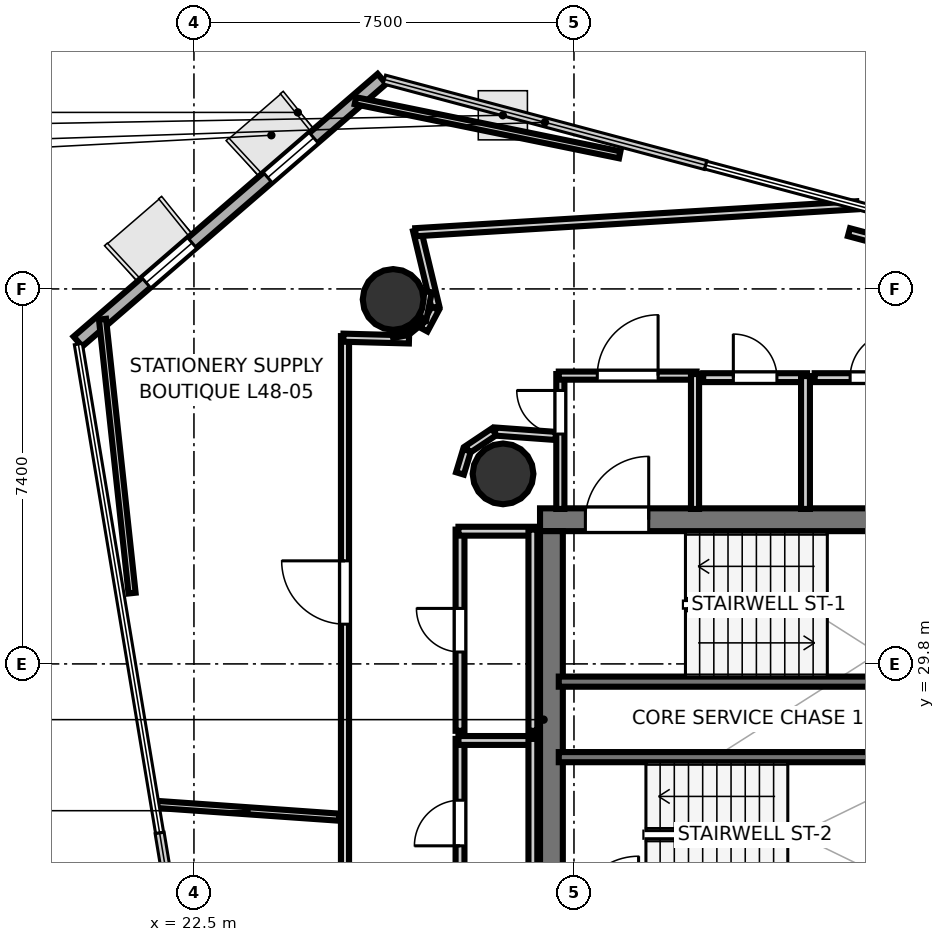
"""IFC4 building model, lengths in metres.
Left out: names, types, materials, properties, quantities, classifications, styles, units other than length and angle.
Written with IfcOpenShell. Run it as: python <this file> out.ifc"""

import sys

from ifc_helpers import new_model, si_unit, direction, frame, frame_2d, origin, origin_2d, place, context, subcontext, project, spatial, rectangle, hollow_circle, extrude, element, fill, save


model = new_model("IFC4")
c1 = context("Model", 3, precision=1e-05, world=origin(), true_north=direction((0.0, 1.0)))
c2 = subcontext(c1, "Body", "Model", "MODEL_VIEW")
j1 = project(units=[si_unit("LENGTHUNIT", "METRE"), si_unit("PLANEANGLEUNIT", "RADIAN")], contexts=[c1])
p1 = place(None, origin())
s1 = spatial("IfcSite", under=j1, at=p1, CompositionType="ELEMENT")
p2 = place(p1, origin())
s2 = spatial("IfcBuilding", under=s1, at=p2, CompositionType="ELEMENT")
p3 = place(p2, frame((0.0, 0.0, 189.2)))
s3 = spatial("IfcBuildingStorey", under=s2, at=p3, CompositionType="ELEMENT", Elevation=189.2)
p4 = place(p3, frame((29.33, 32.645, 0.0), z_axis=(0.0, 0.0, 1.0), x_axis=(1.0, 0.0, 0.0)))
e1 = element("IfcWall", 1, at=p4, inside=s3, PredefinedType="SHEAR", context=c2, shape_type="SweptSolid", body=[
    extrude(rectangle(XDim=10.52, YDim=0.45, at=frame_2d((5.26, 0.0))), origin(), (0.0, 0.0, 1.0), 3.52),
])
p5 = place(p4, frame((0.895, 0.0, 0.0)))
e2 = element("IfcOpeningElement", 2, at=p5, cuts=e1, PredefinedType="OPENING", context=c2, shape_type="SweptSolid", body=[
    extrude(rectangle(XDim=1.25, YDim=2.15, at=frame_2d((0.625, 1.075))), frame((0.0, 0.235, 0.0), z_axis=(0.0, -1.0, 0.0), x_axis=(1.0, 0.0, 0.0)), (0.0, 0.0, 1.0), 0.47),
])
p6 = place(p3, frame((29.555, 24.98, 0.0), z_axis=(0.0, 0.0, 1.0), x_axis=(0.0, 1.0, 0.0)))
e3 = element("IfcWall", 3, at=p6, inside=s3, PredefinedType="SHEAR", context=c2, shape_type="SweptSolid", body=[
    extrude(rectangle(XDim=7.44, YDim=0.45, at=frame_2d((3.72, 0.0))), origin(), (0.0, 0.0, 1.0), 3.52),
])
p7 = place(p3, frame((28.6, 33.55, 0.0), z_axis=(0.0, 0.0, 1.0), x_axis=(1.0, 0.0, 0.0)))
e4 = element("IfcColumn", 4, at=p7, inside=s3, PredefinedType="COLUMN", context=c2, shape_type="SweptSolid", body=[
    extrude(hollow_circle(Radius=0.6, WallThickness=0.03, at=origin_2d()), origin(), (0.0, 0.0, 1.0), 3.7),
])
p8 = place(p3, frame((26.431, 36.992, -0.23), z_axis=(0.0, 0.0, 1.0), x_axis=(1.0, 0.0, 0.0)))
e5 = element("IfcColumn", 5, at=p8, inside=s3, PredefinedType="COLUMN", context=c2, shape_type="SweptSolid", body=[
    extrude(hollow_circle(Radius=0.6, WallThickness=0.03, at=origin_2d()), origin(), (0.0, 0.0, 1.0), 3.93),
])
p9 = place(p3, frame((26.21, 41.345, 0.0), z_axis=(0.0, 0.0, 1.0), x_axis=(-0.756696991228, -0.653765755808, 0.0)))
e6 = element("IfcWall", 6, at=p9, inside=s3, PredefinedType="SOLIDWALL", context=c2, shape_type="SweptSolid", body=[
    extrude(rectangle(XDim=7.929, YDim=0.26, at=frame_2d((3.965, 0.0))), origin(), (0.0, 0.0, 1.0), 3.52),
])
p10 = place(p9, frame((1.779, 0.0, 0.9)))
e7 = element("IfcOpeningElement", 7, at=p10, cuts=e6, PredefinedType="OPENING", context=c2, shape_type="SweptSolid", body=[
    extrude(rectangle(XDim=1.2, YDim=2.0, at=frame_2d((0.6, 1.0))), frame((0.0, 0.14, 0.0), z_axis=(0.0, -1.0, 0.0), x_axis=(1.0, 0.0, 0.0)), (0.0, 0.0, 1.0), 0.28),
])
p11 = place(p9, frame((4.95, 0.0, 0.9)))
e8 = element("IfcOpeningElement", 8, at=p11, cuts=e6, PredefinedType="OPENING", context=c2, shape_type="SweptSolid", body=[
    extrude(rectangle(XDim=1.2, YDim=2.0, at=frame_2d((0.6, 1.0))), frame((0.0, 0.14, 0.0), z_axis=(0.0, -1.0, 0.0), x_axis=(1.0, 0.0, 0.0)), (0.0, 0.0, 1.0), 0.28),
])
p12 = place(p3, frame((29.7, 29.45, 0.0), z_axis=(0.0, 0.0, 1.0), x_axis=(1.0, 0.0, 0.0)))
e9 = element("IfcWall", 9, at=p12, inside=s3, PredefinedType="SOLIDWALL", context=c2, shape_type="SweptSolid", body=[
    extrude(rectangle(XDim=8.3, YDim=0.2, at=frame_2d((4.15, 0.0))), origin(), (0.0, 0.0, 1.0), 3.52),
])
p13 = place(p3, frame((29.7, 27.96, 0.0), z_axis=(0.0, 0.0, 1.0), x_axis=(1.0, 0.0, 0.0)))
e10 = element("IfcWall", 10, at=p13, inside=s3, PredefinedType="SOLIDWALL", context=c2, shape_type="SweptSolid", body=[
    extrude(rectangle(XDim=7.75, YDim=0.2, at=frame_2d((3.875, 0.0))), origin(), (0.0, 0.0, 1.0), 3.52),
])
p14 = place(p3, frame((29.731, 32.858, 0.0), z_axis=(0.0, 0.0, 1.0), x_axis=(0.0, 1.0, 0.0)))
e11 = element("IfcWall", 11, at=p14, inside=s3, PredefinedType="PARTITIONING", context=c2, shape_type="SweptSolid", body=[
    extrude(rectangle(XDim=2.662, YDim=0.16, at=frame_2d((1.331, 0.0))), origin(), (0.0, 0.0, 1.0), 2.84),
])
p15 = place(p14, frame((1.478, 0.0, 0.0)))
e12 = element("IfcOpeningElement", 12, at=p15, cuts=e11, PredefinedType="OPENING", context=c2, shape_type="SweptSolid", body=[
    extrude(rectangle(XDim=0.86, YDim=2.05, at=frame_2d((0.43, 1.025))), frame((0.0, 0.09, 0.0), z_axis=(0.0, -1.0, 0.0), x_axis=(1.0, 0.0, 0.0)), (0.0, 0.0, 1.0), 0.18),
])
p16 = place(p3, frame((29.7, 35.489, 0.0), z_axis=(0.0, 0.0, 1.0), x_axis=(1.0, 0.0, 0.0)))
e13 = element("IfcWall", 13, at=p16, inside=s3, PredefinedType="PARTITIONING", context=c2, shape_type="SweptSolid", body=[
    extrude(rectangle(XDim=2.72, YDim=0.16, at=frame_2d((1.36, 0.0))), origin(), (0.0, 0.0, 1.0), 2.84),
])
p17 = place(p16, frame((0.76, 0.0, 0.0)))
e14 = element("IfcOpeningElement", 14, at=p17, cuts=e13, PredefinedType="OPENING", context=c2, shape_type="SweptSolid", body=[
    extrude(rectangle(XDim=1.2, YDim=2.15, at=frame_2d((0.6, 1.075))), frame((0.0, 0.09, 0.0), z_axis=(0.0, -1.0, 0.0), x_axis=(1.0, 0.0, 0.0)), (0.0, 0.0, 1.0), 0.18),
])
p18 = place(p3, frame((32.389, 35.52, 0.0), z_axis=(0.0, 0.0, 1.0), x_axis=(0.0, -1.0, 0.0)))
e15 = element("IfcWall", 15, at=p18, inside=s3, PredefinedType="PARTITIONING", context=c2, shape_type="SweptSolid", body=[
    extrude(rectangle(XDim=2.662, YDim=0.16, at=frame_2d((1.331, 0.0))), origin(), (0.0, 0.0, 1.0), 2.84),
])
p19 = place(p3, frame((32.55, 35.449, 0.0), z_axis=(0.0, 0.0, 1.0), x_axis=(1.0, 0.0, 0.0)))
e16 = element("IfcWall", 16, at=p19, inside=s3, PredefinedType="PLUMBINGWALL", context=c2, shape_type="SweptSolid", body=[
    extrude(rectangle(XDim=2.05, YDim=0.175, at=frame_2d((1.025, 0.0))), origin(), (0.0, 0.0, 1.0), 2.84),
])
p20 = place(p19, frame((0.595, 0.0, 0.0)))
e17 = element("IfcOpeningElement", 17, at=p20, cuts=e16, PredefinedType="OPENING", context=c2, shape_type="SweptSolid", body=[
    extrude(rectangle(XDim=0.86, YDim=2.05, at=frame_2d((0.43, 1.025))), frame((0.0, 0.097, 0.0), z_axis=(0.0, -1.0, 0.0), x_axis=(1.0, 0.0, 0.0)), (0.0, 0.0, 1.0), 0.195),
])
p21 = place(p3, frame((34.569, 35.48, 0.0), z_axis=(0.0, 0.0, 1.0), x_axis=(0.0, -1.0, 0.0)))
e18 = element("IfcWall", 18, at=p21, inside=s3, PredefinedType="PLUMBINGWALL", context=c2, shape_type="SweptSolid", body=[
    extrude(rectangle(XDim=2.622, YDim=0.175, at=frame_2d((1.311, 0.0))), origin(), (0.0, 0.0, 1.0), 2.84),
])
p22 = place(p3, frame((34.75, 35.449, 0.0), z_axis=(0.0, 0.0, 1.0), x_axis=(1.0, 0.0, 0.0)))
e19 = element("IfcWall", 19, at=p22, inside=s3, PredefinedType="PLUMBINGWALL", context=c2, shape_type="SweptSolid", body=[
    extrude(rectangle(XDim=2.3, YDim=0.175, at=frame_2d((1.15, 0.0))), origin(), (0.0, 0.0, 1.0), 2.84),
])
p23 = place(p22, frame((0.7, 0.0, 0.0)))
e20 = element("IfcOpeningElement", 20, at=p23, cuts=e19, PredefinedType="OPENING", context=c2, shape_type="SweptSolid", body=[
    extrude(rectangle(XDim=0.9, YDim=2.1, at=frame_2d((0.45, 1.05))), frame((0.0, 0.097, 0.0), z_axis=(0.0, -1.0, 0.0), x_axis=(1.0, 0.0, 0.0)), (0.0, 0.0, 1.0), 0.195),
])
p24 = place(p3, frame((27.751, 25.0, 0.0), z_axis=(0.0, 0.0, 1.0), x_axis=(0.0, 1.0, 0.0)))
e21 = element("IfcWall", 21, at=p24, inside=s3, PredefinedType="PLUMBINGWALL", context=c2, shape_type="SweptSolid", body=[
    extrude(rectangle(XDim=3.32, YDim=0.175, at=frame_2d((1.66, 0.0))), origin(), (0.0, 0.0, 1.0), 2.84),
])
p25 = place(p24, frame((1.21, 0.0, 0.0)))
e22 = element("IfcOpeningElement", 22, at=p25, cuts=e21, PredefinedType="OPENING", context=c2, shape_type="SweptSolid", body=[
    extrude(rectangle(XDim=0.9, YDim=2.1, at=frame_2d((0.45, 1.05))), frame((0.0, 0.097, 0.0), z_axis=(0.0, -1.0, 0.0), x_axis=(1.0, 0.0, 0.0)), (0.0, 0.0, 1.0), 0.195),
])
p26 = place(p3, frame((27.72, 28.289, 0.0), z_axis=(0.0, 0.0, 1.0), x_axis=(1.0, 0.0, 0.0)))
e23 = element("IfcWall", 23, at=p26, inside=s3, PredefinedType="PLUMBINGWALL", context=c2, shape_type="SweptSolid", body=[
    extrude(rectangle(XDim=1.5, YDim=0.175, at=frame_2d((0.75, 0.0))), origin(), (0.0, 0.0, 1.0), 2.84),
])
p27 = place(p3, frame((29.189, 28.32, 0.0), z_axis=(0.0, 0.0, 1.0), x_axis=(0.0, -1.0, 0.0)))
e24 = element("IfcWall", 24, at=p27, inside=s3, PredefinedType="PLUMBINGWALL", context=c2, shape_type="SweptSolid", body=[
    extrude(rectangle(XDim=3.32, YDim=0.175, at=frame_2d((1.66, 0.0))), origin(), (0.0, 0.0, 1.0), 2.84),
])
p28 = place(p3, frame((27.751, 28.48, 0.0), z_axis=(0.0, 0.0, 1.0), x_axis=(0.0, 1.0, 0.0)))
e25 = element("IfcWall", 25, at=p28, inside=s3, PredefinedType="PLUMBINGWALL", context=c2, shape_type="SweptSolid", body=[
    extrude(rectangle(XDim=3.97, YDim=0.175, at=frame_2d((1.985, 0.0))), origin(), (0.0, 0.0, 1.0), 2.84),
])
p29 = place(p28, frame((1.555, 0.0, 0.0)))
e26 = element("IfcOpeningElement", 26, at=p29, cuts=e25, PredefinedType="OPENING", context=c2, shape_type="SweptSolid", body=[
    extrude(rectangle(XDim=0.86, YDim=2.05, at=frame_2d((0.43, 1.025))), frame((0.0, 0.097, 0.0), z_axis=(0.0, -1.0, 0.0), x_axis=(1.0, 0.0, 0.0)), (0.0, 0.0, 1.0), 0.195),
])
p30 = place(p3, frame((27.72, 32.419, 0.0), z_axis=(0.0, 0.0, 1.0), x_axis=(1.0, 0.0, 0.0)))
e27 = element("IfcWall", 27, at=p30, inside=s3, PredefinedType="PLUMBINGWALL", context=c2, shape_type="SweptSolid", body=[
    extrude(rectangle(XDim=1.5, YDim=0.175, at=frame_2d((0.75, 0.0))), origin(), (0.0, 0.0, 1.0), 2.84),
])
p31 = place(p3, frame((29.189, 32.45, 0.0), z_axis=(0.0, 0.0, 1.0), x_axis=(0.0, -1.0, 0.0)))
e28 = element("IfcWall", 28, at=p31, inside=s3, PredefinedType="PLUMBINGWALL", context=c2, shape_type="SweptSolid", body=[
    extrude(rectangle(XDim=3.97, YDim=0.175, at=frame_2d((1.985, 0.0))), origin(), (0.0, 0.0, 1.0), 2.84),
])
p32 = place(p3, frame((27.265, 36.839, 0.0), z_axis=(0.0, 0.0, 1.0), x_axis=(-0.232734022169, 0.972540423286, 0.0)))
e29 = element("IfcWall", 29, at=p32, inside=s3, PredefinedType="PARTITIONING", context=c2, shape_type="SweptSolid", body=[
    extrude(rectangle(XDim=1.561, YDim=0.16, at=frame_2d((0.781, 0.0))), origin(), (0.0, 0.0, 1.0), 2.84),
])
p33 = place(p3, frame((26.872, 38.319, 0.0), z_axis=(0.0, 0.0, 1.0), x_axis=(0.99814279394, 0.060917673182, 0.0)))
e30 = element("IfcWall", 30, at=p33, inside=s3, PredefinedType="PARTITIONING", context=c2, shape_type="SweptSolid", body=[
    extrude(rectangle(XDim=8.721, YDim=0.16, at=frame_2d((4.36, 0.0))), origin(), (0.0, 0.0, 1.0), 2.84),
])
p34 = place(p3, frame((35.427, 38.32, 0.0), z_axis=(0.0, 0.0, 1.0), x_axis=(0.966323909007, -0.257328783625, 0.0)))
e31 = element("IfcWall", 31, at=p34, inside=s3, PredefinedType="PARTITIONING", context=c2, shape_type="SweptSolid", body=[
    extrude(rectangle(XDim=1.775, YDim=0.16, at=frame_2d((0.888, 0.0))), origin(), (0.0, 0.0, 1.0), 2.84),
])
p35 = place(p3, frame((29.64, 34.299, 0.0), z_axis=(0.0, 0.0, 1.0), x_axis=(-0.997392224386, 0.072171675429, 0.0)))
e32 = element("IfcWall", 32, at=p35, inside=s3, PredefinedType="PARTITIONING", context=c2, shape_type="SweptSolid", body=[
    extrude(rectangle(XDim=1.201, YDim=0.16, at=frame_2d((0.601, 0.0))), origin(), (0.0, 0.0, 1.0), 2.84),
])
p36 = place(p3, frame((28.423, 34.38, 0.0), z_axis=(0.0, 0.0, 1.0), x_axis=(-0.831571279003, -0.555418047903, 0.0)))
e33 = element("IfcWall", 33, at=p36, inside=s3, PredefinedType="PARTITIONING", context=c2, shape_type="SweptSolid", body=[
    extrude(rectangle(XDim=0.628, YDim=0.16, at=frame_2d((0.314, 0.0))), origin(), (0.0, 0.0, 1.0), 2.84),
])
p37 = place(p3, frame((27.888, 34.015, 0.0), z_axis=(0.0, 0.0, 1.0), x_axis=(-0.290263585829, -0.956946733492, 0.0)))
e34 = element("IfcWall", 34, at=p37, inside=s3, PredefinedType="PARTITIONING", context=c2, shape_type="SweptSolid", body=[
    extrude(rectangle(XDim=0.476, YDim=0.16, at=frame_2d((0.238, 0.0))), origin(), (0.0, 0.0, 1.0), 2.84),
])
p38 = place(p3, frame((25.481, 18.05, 0.0), z_axis=(0.0, 0.0, 1.0), x_axis=(0.0, 1.0, 0.0)))
e35 = element("IfcWall", 35, at=p38, inside=s3, PredefinedType="PARTITIONING", context=c2, shape_type="SweptSolid", body=[
    extrude(rectangle(XDim=18.219, YDim=0.16, at=frame_2d((9.109, 0.0))), origin(), (0.0, 0.0, 1.0), 2.84),
])
p39 = place(p38, frame((5.244, 0.0, 0.0)))
e36 = element("IfcOpeningElement", 36, at=p39, cuts=e35, PredefinedType="OPENING", context=c2, shape_type="SweptSolid", body=[
    extrude(rectangle(XDim=1.25, YDim=2.2, at=frame_2d((0.625, 1.1))), frame((0.0, 0.09, 0.0), z_axis=(0.0, -1.0, 0.0), x_axis=(1.0, 0.0, 0.0)), (0.0, 0.0, 1.0), 0.18),
])
p40 = place(p38, frame((12.534, 0.0, 0.0)))
e37 = element("IfcOpeningElement", 37, at=p40, cuts=e35, PredefinedType="OPENING", context=c2, shape_type="SweptSolid", body=[
    extrude(rectangle(XDim=1.25, YDim=2.2, at=frame_2d((0.625, 1.1))), frame((0.0, 0.09, 0.0), z_axis=(0.0, -1.0, 0.0), x_axis=(1.0, 0.0, 0.0)), (0.0, 0.0, 1.0), 0.18),
])
p41 = place(p3, frame((25.449, 36.238, 0.0), z_axis=(0.0, 0.0, 1.0), x_axis=(0.999651698073, -0.026390955635, 0.0)))
e38 = element("IfcWall", 38, at=p41, inside=s3, PredefinedType="PARTITIONING", context=c2, shape_type="SweptSolid", body=[
    extrude(rectangle(XDim=1.295, YDim=0.16, at=frame_2d((0.647, 0.0))), origin(), (0.0, 0.0, 1.0), 2.84),
])
p42 = place(p3, frame((27.038, 36.398, 0.0), z_axis=(0.0, 0.0, 1.0), x_axis=(0.471865548338, 0.881670519123, 0.0)))
e39 = element("IfcWall", 39, at=p42, inside=s3, PredefinedType="PARTITIONING", context=c2, shape_type="SweptSolid", body=[
    extrude(rectangle(XDim=0.476, YDim=0.16, at=frame_2d((0.238, 0.0))), origin(), (0.0, 0.0, 1.0), 2.84),
])
p43 = place(p3, frame((21.708, 27.031, 0.0), z_axis=(0.0, 0.0, 1.0), x_axis=(0.997564989829, -0.06974303598, 0.0)))
e40 = element("IfcWall", 40, at=p43, inside=s3, PredefinedType="PARTITIONING", context=c2, shape_type="SweptSolid", body=[
    extrude(rectangle(XDim=3.669, YDim=0.14, at=frame_2d((1.834, 0.0))), origin(), (0.0, 0.0, 1.0), 2.84),
])
p44 = place(p3, frame((25.686, 40.914, 0.0), z_axis=(0.0, 0.0, 1.0), x_axis=(0.979692625984, -0.200505258269, 0.0)))
e41 = element("IfcWall", 41, at=p44, inside=s3, PredefinedType="PARTITIONING", context=c2, shape_type="SweptSolid", body=[
    extrude(rectangle(XDim=5.325, YDim=0.14, at=frame_2d((2.662, 0.0))), origin(), (0.0, 0.0, 1.0), 2.84),
])
p45 = place(p3, frame((27.125, 37.146, 0.0), z_axis=(0.0, 0.0, 1.0), x_axis=(-0.195051328877, -0.980793035815, 0.0)))
e42 = element("IfcWall", 42, at=p45, inside=s3, PredefinedType="PARTITIONING", context=c2, shape_type="SweptSolid", body=[
    extrude(rectangle(XDim=0.573, YDim=0.14, at=frame_2d((0.287, 0.0))), origin(), (0.0, 0.0, 1.0), 2.84),
])
p46 = place(p3, frame((27.024, 36.602, 0.0), z_axis=(0.0, 0.0, 1.0), x_axis=(-0.775745027902, -0.631046473475, 0.0)))
e43 = element("IfcWall", 43, at=p46, inside=s3, PredefinedType="PARTITIONING", context=c2, shape_type="SweptSolid", body=[
    extrude(rectangle(XDim=0.425, YDim=0.12, at=frame_2d((0.213, 0.0))), origin(), (0.0, 0.0, 1.0), 2.84),
])
p47 = place(p3, frame((26.708, 36.34, 0.0), z_axis=(0.0, 0.0, 1.0), x_axis=(-0.980868818587, -0.194669876261, 0.0)))
e44 = element("IfcWall", 44, at=p47, inside=s3, PredefinedType="PARTITIONING", context=c2, shape_type="SweptSolid", body=[
    extrude(rectangle(XDim=0.292, YDim=0.105, at=frame_2d((0.146, 0.0))), origin(), (0.0, 0.0, 1.0), 2.84),
])
p48 = place(p3, frame((21.279, 31.197, 0.0), z_axis=(0.0, 0.0, 1.0), x_axis=(-0.107360687826, 0.994220137952, 0.0)))
e45 = element("IfcWall", 45, at=p48, inside=s3, PredefinedType="PARTITIONING", context=c2, shape_type="SweptSolid", body=[
    extrude(rectangle(XDim=5.437, YDim=0.14, at=frame_2d((2.719, 0.0))), origin(), (0.0, 0.0, 1.0), 2.84),
])
p49 = place(p5, origin())
e46 = element("IfcDoor", 46, at=p49, inside=s3, OperationType="SINGLE_SWING_RIGHT", PredefinedType="DOOR", context=c2, shape_type="SweptSolid", body=[
    extrude(rectangle(XDim=1.25, YDim=2.15, at=frame_2d((0.625, 1.075))), frame((0.0, 0.025, 0.0), z_axis=(0.0, -1.0, 0.0), x_axis=(1.0, 0.0, 0.0)), (0.0, 0.0, 1.0), 0.05),
])
fill(e2, e46)
p50 = place(p17, origin())
e47 = element("IfcDoor", 47, at=p50, inside=s3, OperationType="SINGLE_SWING_RIGHT", PredefinedType="DOOR", context=c2, shape_type="SweptSolid", body=[
    extrude(rectangle(XDim=1.2, YDim=2.15, at=frame_2d((0.6, 1.075))), frame((0.0, 0.025, 0.0), z_axis=(0.0, -1.0, 0.0), x_axis=(1.0, 0.0, 0.0)), (0.0, 0.0, 1.0), 0.05),
])
fill(e14, e47)
p51 = place(p20, origin())
e48 = element("IfcDoor", 48, at=p51, inside=s3, OperationType="SINGLE_SWING_LEFT", PredefinedType="DOOR", context=c2, shape_type="SweptSolid", body=[
    extrude(rectangle(XDim=0.86, YDim=2.05, at=frame_2d((0.43, 1.025))), frame((0.0, 0.025, 0.0), z_axis=(0.0, -1.0, 0.0), x_axis=(1.0, 0.0, 0.0)), (0.0, 0.0, 1.0), 0.05),
])
fill(e17, e48)
p52 = place(p23, origin())
e49 = element("IfcDoor", 49, at=p52, inside=s3, OperationType="SINGLE_SWING_RIGHT", PredefinedType="DOOR", context=c2, shape_type="SweptSolid", body=[
    extrude(rectangle(XDim=0.9, YDim=2.1, at=frame_2d((0.45, 1.05))), frame((0.0, 0.025, 0.0), z_axis=(0.0, -1.0, 0.0), x_axis=(1.0, 0.0, 0.0)), (0.0, 0.0, 1.0), 0.05),
])
fill(e20, e49)
p53 = place(p25, origin())
e50 = element("IfcDoor", 50, at=p53, inside=s3, OperationType="SINGLE_SWING_LEFT", PredefinedType="DOOR", context=c2, shape_type="SweptSolid", body=[
    extrude(rectangle(XDim=0.9, YDim=2.1, at=frame_2d((0.45, 1.05))), frame((0.0, 0.025, 0.0), z_axis=(0.0, -1.0, 0.0), x_axis=(1.0, 0.0, 0.0)), (0.0, 0.0, 1.0), 0.05),
])
fill(e22, e50)
p54 = place(p29, origin())
e51 = element("IfcDoor", 51, at=p54, inside=s3, OperationType="SINGLE_SWING_RIGHT", PredefinedType="DOOR", context=c2, shape_type="SweptSolid", body=[
    extrude(rectangle(XDim=0.86, YDim=2.05, at=frame_2d((0.43, 1.025))), frame((0.0, 0.025, 0.0), z_axis=(0.0, -1.0, 0.0), x_axis=(1.0, 0.0, 0.0)), (0.0, 0.0, 1.0), 0.05),
])
fill(e26, e51)
p55 = place(p15, origin())
e52 = element("IfcDoor", 52, at=p55, inside=s3, OperationType="SINGLE_SWING_RIGHT", PredefinedType="DOOR", context=c2, shape_type="SweptSolid", body=[
    extrude(rectangle(XDim=0.86, YDim=2.05, at=frame_2d((0.43, 1.025))), frame((0.0, 0.025, 0.0), z_axis=(0.0, -1.0, 0.0), x_axis=(1.0, 0.0, 0.0)), (0.0, 0.0, 1.0), 0.05),
])
fill(e12, e52)
p56 = place(p40, origin())
e53 = element("IfcDoor", 53, at=p56, inside=s3, OperationType="SINGLE_SWING_RIGHT", PredefinedType="DOOR", context=c2, shape_type="SweptSolid", body=[
    extrude(rectangle(XDim=1.25, YDim=2.2, at=frame_2d((0.625, 1.1))), frame((0.0, 0.025, 0.0), z_axis=(0.0, -1.0, 0.0), x_axis=(1.0, 0.0, 0.0)), (0.0, 0.0, 1.0), 0.05),
])
fill(e37, e53)
p57 = place(p10, origin())
e54 = element("IfcWindow", 54, at=p57, inside=s3, PartitioningType="SINGLE_PANEL", PredefinedType="WINDOW", context=c2, shape_type="SweptSolid", body=[
    extrude(rectangle(XDim=1.2, YDim=2.0, at=frame_2d((0.6, 1.0))), frame((0.0, 0.03, 0.0), z_axis=(0.0, -1.0, 0.0), x_axis=(1.0, 0.0, 0.0)), (0.0, 0.0, 1.0), 0.06),
])
fill(e7, e54)
p58 = place(p11, origin())
e55 = element("IfcWindow", 55, at=p58, inside=s3, PartitioningType="SINGLE_PANEL", PredefinedType="WINDOW", context=c2, shape_type="SweptSolid", body=[
    extrude(rectangle(XDim=1.2, YDim=2.0, at=frame_2d((0.6, 1.0))), frame((0.0, 0.03, 0.0), z_axis=(0.0, -1.0, 0.0), x_axis=(1.0, 0.0, 0.0)), (0.0, 0.0, 1.0), 0.06),
])
fill(e8, e55)
save(model, sys.argv[1])
